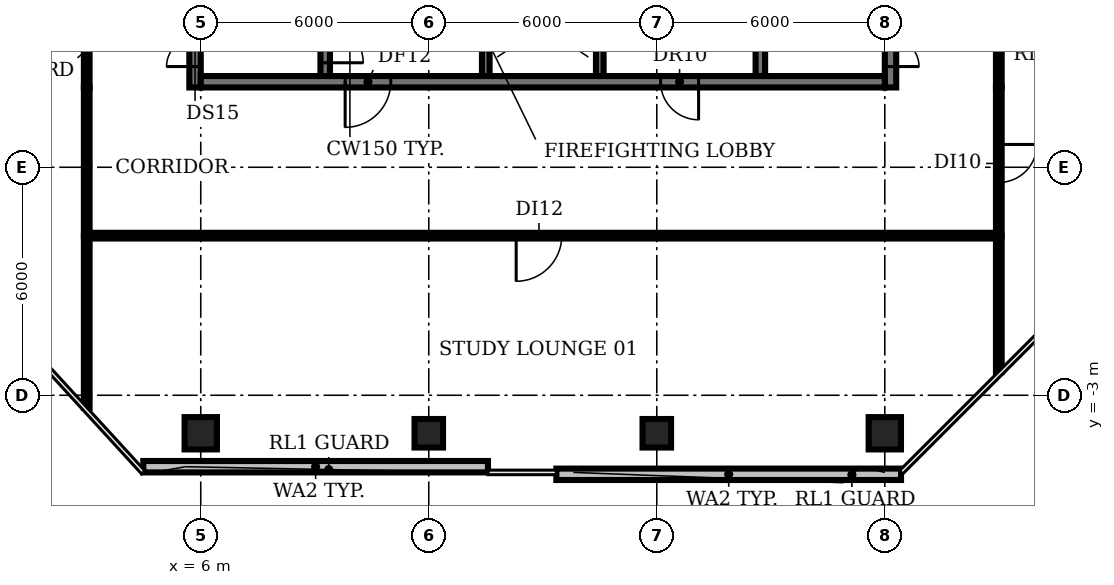
"""IFC4 building model, lengths in metres.
Left out: names, types, materials, properties, quantities, classifications, styles, units other than length and angle.
Written with IfcOpenShell. Run it as: python <this file> out.ifc"""

import sys

from ifc_helpers import new_model, si_unit, direction, frame, frame_2d, origin, origin_2d, place, context, subcontext, project, spatial, rectangle, circle, extrude, element, fill, save


model = new_model("IFC4")
c1 = context("Model", 3, precision=1e-05, world=origin(), true_north=direction((0.0, 1.0)))
c2 = subcontext(c1, "Body", "Model", "MODEL_VIEW")
j1 = project(units=[si_unit("LENGTHUNIT", "METRE"), si_unit("PLANEANGLEUNIT", "RADIAN")], contexts=[c1])
p1 = place(None, origin())
s1 = spatial("IfcSite", under=j1, at=p1, CompositionType="ELEMENT")
p2 = place(p1, origin())
s2 = spatial("IfcBuilding", under=s1, at=p2, CompositionType="ELEMENT")
p3 = place(p2, frame((0.0, 0.0, 276.8)))
s3 = spatial("IfcBuildingStorey", under=s2, at=p3, CompositionType="ELEMENT", Elevation=276.8)
p4 = place(p3, frame((6.0, -4.0, 0.0), z_axis=(0.0, 0.0, 1.0), x_axis=(1.0, 0.0, 0.0)))
e1 = element("IfcColumn", 1, at=p4, inside=s3, PredefinedType="COLUMN", context=c2, shape_type="SweptSolid", body=[
    extrude(circle(Radius=0.425, at=origin_2d()), origin(), (0.0, 0.0, 1.0), 3.85),
])
for number, where, z_axis, x_axis in (
    (2, (12.0, -4.0, 0.0), (0.0, 0.0, 1.0), (1.0, 0.0, 0.0)),
    (3, (18.0, -4.0, 0.0), (0.0, 0.0, 1.0), (1.0, 0.0, 0.0)),
):
    element("IfcColumn", number, at=place(p3, frame(where, z_axis=z_axis, x_axis=x_axis)), inside=s3, PredefinedType="COLUMN", context=c2, shape_type="SweptSolid", body=[
        extrude(rectangle(XDim=0.75, YDim=0.75, at=origin_2d()), origin(), (0.0, 0.0, 1.0), 3.85),
    ])
p5 = place(p3, frame((24.0, -4.0, 0.0), z_axis=(0.0, 0.0, 1.0), x_axis=(1.0, 0.0, 0.0)))
e4 = element("IfcColumn", 4, at=p5, inside=s3, PredefinedType="COLUMN", context=c2, shape_type="SweptSolid", body=[
    extrude(circle(Radius=0.425, at=origin_2d()), origin(), (0.0, 0.0, 1.0), 3.85),
])
p6 = place(p3, frame((4.489, -4.88, 0.0), z_axis=(0.0, 0.0, 1.0), x_axis=(1.0, 0.0, 0.0)))
e5 = element("IfcWall", 5, at=p6, inside=s3, PredefinedType="SOLIDWALL", context=c2, shape_type="SweptSolid", body=[
    extrude(rectangle(XDim=9.069, YDim=0.3, at=frame_2d((4.535, 0.0))), origin(), (0.0, 0.0, 1.0), 3.85),
])
p7 = place(p3, frame((15.358, -5.08, 0.0), z_axis=(0.0, 0.0, 1.0), x_axis=(1.0, 0.0, 0.0)))
e6 = element("IfcWall", 6, at=p7, inside=s3, PredefinedType="SOLIDWALL", context=c2, shape_type="SweptSolid", body=[
    extrude(rectangle(XDim=9.069, YDim=0.3, at=frame_2d((4.534, 0.0))), origin(), (0.0, 0.0, 1.0), 3.85),
])
p8 = place(p3, frame((9.275, 11.825, 0.0), z_axis=(0.0, 0.0, 1.0), x_axis=(0.0, -1.0, 0.0)))
e7 = element("IfcWall", 7, at=p8, inside=s3, PredefinedType="SHEAR", context=c2, shape_type="SweptSolid", body=[
    extrude(rectangle(XDim=6.425, YDim=0.25, at=frame_2d((3.212, 0.0))), origin(), (0.0, 0.0, 1.0), 3.85),
])
p9 = place(p8, frame((5.075, 0.0, 0.0)))
e8 = element("IfcOpeningElement", 8, at=p9, cuts=e7, PredefinedType="OPENING", context=c2, shape_type="SweptSolid", body=[
    extrude(rectangle(XDim=1.0, YDim=2.1, at=frame_2d((0.5, 1.05))), frame((0.0, 0.135, 0.0), z_axis=(0.0, -1.0, 0.0), x_axis=(1.0, 0.0, 0.0)), (0.0, 0.0, 1.0), 0.27),
])
p10 = place(p3, frame((13.5, 5.4, 0.0), z_axis=(0.0, 0.0, 1.0), x_axis=(0.0, 1.0, 0.0)))
e9 = element("IfcWall", 9, at=p10, inside=s3, PredefinedType="SHEAR", context=c2, shape_type="SweptSolid", body=[
    extrude(rectangle(XDim=8.2, YDim=0.2, at=frame_2d((4.1, 0.0))), origin(), (0.0, 0.0, 1.0), 3.85),
])
p11 = place(p10, frame((0.75, 0.0, 0.0)))
e10 = element("IfcOpeningElement", 10, at=p11, cuts=e9, PredefinedType="OPENING", context=c2, shape_type="SweptSolid", body=[
    extrude(rectangle(XDim=1.1, YDim=2.1, at=frame_2d((0.55, 1.05))), frame((0.0, 0.11, 0.0), z_axis=(0.0, -1.0, 0.0), x_axis=(1.0, 0.0, 0.0)), (0.0, 0.0, 1.0), 0.22),
])
p12 = place(p10, frame((3.55, 0.0, 0.0)))
e11 = element("IfcOpeningElement", 11, at=p12, cuts=e9, PredefinedType="OPENING", context=c2, shape_type="SweptSolid", body=[
    extrude(rectangle(XDim=1.1, YDim=2.1, at=frame_2d((0.55, 1.05))), frame((0.0, 0.11, 0.0), z_axis=(0.0, -1.0, 0.0), x_axis=(1.0, 0.0, 0.0)), (0.0, 0.0, 1.0), 0.22),
])
p13 = place(p10, frame((6.35, 0.0, 0.0)))
e12 = element("IfcOpeningElement", 12, at=p13, cuts=e9, PredefinedType="OPENING", context=c2, shape_type="SweptSolid", body=[
    extrude(rectangle(XDim=1.1, YDim=2.1, at=frame_2d((0.55, 1.05))), frame((0.0, 0.11, 0.0), z_axis=(0.0, -1.0, 0.0), x_axis=(1.0, 0.0, 0.0)), (0.0, 0.0, 1.0), 0.22),
])
p14 = place(p3, frame((16.5, 5.4, 0.0), z_axis=(0.0, 0.0, 1.0), x_axis=(0.0, 1.0, 0.0)))
e13 = element("IfcWall", 13, at=p14, inside=s3, PredefinedType="SHEAR", context=c2, shape_type="SweptSolid", body=[
    extrude(rectangle(XDim=8.2, YDim=0.2, at=frame_2d((4.1, 0.0))), origin(), (0.0, 0.0, 1.0), 3.85),
])
p15 = place(p3, frame((20.725, 5.4, 0.0), z_axis=(0.0, 0.0, 1.0), x_axis=(0.0, 1.0, 0.0)))
e14 = element("IfcWall", 14, at=p15, inside=s3, PredefinedType="SHEAR", context=c2, shape_type="SweptSolid", body=[
    extrude(rectangle(XDim=6.3, YDim=0.25, at=frame_2d((3.15, 0.0))), origin(), (0.0, 0.0, 1.0), 3.85),
])
p16 = place(p3, frame((5.85, 5.1, 0.0), z_axis=(0.0, 0.0, 1.0), x_axis=(0.0, 1.0, 0.0)))
e15 = element("IfcWall", 15, at=p16, inside=s3, PredefinedType="SHEAR", context=c2, shape_type="SweptSolid", body=[
    extrude(rectangle(XDim=20.0, YDim=0.3, at=frame_2d((10.0, 0.0))), origin(), (0.0, 0.0, 1.0), 3.85),
])
p17 = place(p16, frame((0.55, 0.0, 0.0)))
e16 = element("IfcOpeningElement", 16, at=p17, cuts=e15, PredefinedType="OPENING", context=c2, shape_type="SweptSolid", body=[
    extrude(rectangle(XDim=1.5, YDim=2.1, at=frame_2d((0.75, 1.05))), frame((0.0, 0.16, 0.0), z_axis=(0.0, -1.0, 0.0), x_axis=(1.0, 0.0, 0.0)), (0.0, 0.0, 1.0), 0.32),
])
p18 = place(p16, frame((7.0, 0.0, 0.0)))
e17 = element("IfcOpeningElement", 17, at=p18, cuts=e15, PredefinedType="OPENING", context=c2, shape_type="SweptSolid", body=[
    extrude(rectangle(XDim=1.2, YDim=2.1, at=frame_2d((0.6, 1.05))), frame((0.0, 0.16, 0.0), z_axis=(0.0, -1.0, 0.0), x_axis=(1.0, 0.0, 0.0)), (0.0, 0.0, 1.0), 0.32),
])
p19 = place(p16, frame((13.55, 0.0, 0.0)))
e18 = element("IfcOpeningElement", 18, at=p19, cuts=e15, PredefinedType="OPENING", context=c2, shape_type="SweptSolid", body=[
    extrude(rectangle(XDim=1.2, YDim=2.1, at=frame_2d((0.6, 1.05))), frame((0.0, 0.16, 0.0), z_axis=(0.0, -1.0, 0.0), x_axis=(1.0, 0.0, 0.0)), (0.0, 0.0, 1.0), 0.32),
])
p20 = place(p3, frame((24.15, 25.655, 0.0), z_axis=(0.0, 0.0, 1.0), x_axis=(0.0, -1.0, 0.0)))
e19 = element("IfcWall", 19, at=p20, inside=s3, PredefinedType="SHEAR", context=c2, shape_type="SweptSolid", body=[
    extrude(rectangle(XDim=20.555, YDim=0.3, at=frame_2d((10.277, 0.0))), origin(), (0.0, 0.0, 1.0), 3.85),
])
p21 = place(p20, frame((18.505, 0.0, 0.0)))
e20 = element("IfcOpeningElement", 20, at=p21, cuts=e19, PredefinedType="OPENING", context=c2, shape_type="SweptSolid", body=[
    extrude(rectangle(XDim=1.5, YDim=2.1, at=frame_2d((0.75, 1.05))), frame((0.0, 0.16, 0.0), z_axis=(0.0, -1.0, 0.0), x_axis=(1.0, 0.0, 0.0)), (0.0, 0.0, 1.0), 0.32),
])
p22 = place(p20, frame((12.405, 0.0, 0.0)))
e21 = element("IfcOpeningElement", 21, at=p22, cuts=e19, PredefinedType="OPENING", context=c2, shape_type="SweptSolid", body=[
    extrude(rectangle(XDim=0.9, YDim=2.1, at=frame_2d((0.45, 1.05))), frame((0.0, 0.16, 0.0), z_axis=(0.0, -1.0, 0.0), x_axis=(1.0, 0.0, 0.0)), (0.0, 0.0, 1.0), 0.32),
])
p23 = place(p20, frame((6.405, 0.0, 0.0)))
e22 = element("IfcOpeningElement", 22, at=p23, cuts=e19, PredefinedType="OPENING", context=c2, shape_type="SweptSolid", body=[
    extrude(rectangle(XDim=2.0, YDim=2.1, at=frame_2d((1.0, 1.05))), frame((0.0, 0.16, 0.0), z_axis=(0.0, -1.0, 0.0), x_axis=(1.0, 0.0, 0.0)), (0.0, 0.0, 1.0), 0.32),
])
p24 = place(p3, frame((24.0, 5.25, 0.0), z_axis=(0.0, 0.0, 1.0), x_axis=(-1.0, 0.0, 0.0)))
e23 = element("IfcWall", 23, at=p24, inside=s3, PredefinedType="SHEAR", context=c2, shape_type="SweptSolid", body=[
    extrude(rectangle(XDim=18.0, YDim=0.3, at=frame_2d((9.0, 0.0))), origin(), (0.0, 0.0, 1.0), 3.85),
])
p25 = place(p24, frame((13.0, 0.0, 0.0)))
e24 = element("IfcOpeningElement", 24, at=p25, cuts=e23, PredefinedType="OPENING", context=c2, shape_type="SweptSolid", body=[
    extrude(rectangle(XDim=1.2, YDim=2.1, at=frame_2d((0.6, 1.05))), frame((0.0, 0.16, 0.0), z_axis=(0.0, -1.0, 0.0), x_axis=(1.0, 0.0, 0.0)), (0.0, 0.0, 1.0), 0.32),
])
p26 = place(p24, frame((4.9, 0.0, 0.0)))
e25 = element("IfcOpeningElement", 25, at=p26, cuts=e23, PredefinedType="OPENING", context=c2, shape_type="SweptSolid", body=[
    extrude(rectangle(XDim=1.0, YDim=2.1, at=frame_2d((0.5, 1.05))), frame((0.0, 0.16, 0.0), z_axis=(0.0, -1.0, 0.0), x_axis=(1.0, 0.0, 0.0)), (0.0, 0.0, 1.0), 0.32),
])
p27 = place(p3, frame((3.0, -3.33, 0.0), z_axis=(0.0, 0.0, 1.0), x_axis=(0.0, 1.0, 0.0)))
e26 = element("IfcWall", 26, at=p27, inside=s3, PredefinedType="PARTITIONING", context=c2, shape_type="SweptSolid", body=[
    extrude(rectangle(XDim=4.53, YDim=0.15, at=frame_2d((2.265, 0.0))), origin(), (0.0, 0.0, 1.0), 2.9),
])
p28 = place(p3, frame((3.0, 1.2, 0.0), z_axis=(0.0, 0.0, 1.0), x_axis=(0.0, 1.0, 0.0)))
e27 = element("IfcWall", 27, at=p28, inside=s3, PredefinedType="PARTITIONING", context=c2, shape_type="SweptSolid", body=[
    extrude(rectangle(XDim=3.9, YDim=0.15, at=frame_2d((1.95, 0.0))), origin(), (0.0, 0.0, 1.0), 2.9),
])
p29 = place(p3, frame((3.0, 5.1, 0.0), z_axis=(0.0, 0.0, 1.0), x_axis=(0.0, 1.0, 0.0)))
e28 = element("IfcWall", 28, at=p29, inside=s3, PredefinedType="PARTITIONING", context=c2, shape_type="SweptSolid", body=[
    extrude(rectangle(XDim=20.0, YDim=0.15, at=frame_2d((10.0, 0.0))), origin(), (0.0, 0.0, 1.0), 2.9),
])
p30 = place(p29, frame((9.3, 0.0, 0.0)))
e29 = element("IfcOpeningElement", 29, at=p30, cuts=e28, PredefinedType="OPENING", context=c2, shape_type="SweptSolid", body=[
    extrude(rectangle(XDim=1.2, YDim=2.1, at=frame_2d((0.6, 1.05))), frame((0.0, 0.085, 0.0), z_axis=(0.0, -1.0, 0.0), x_axis=(1.0, 0.0, 0.0)), (0.0, 0.0, 1.0), 0.17),
])
p31 = place(p3, frame((27.0, -2.39, 0.0), z_axis=(0.0, 0.0, 1.0), x_axis=(0.0, 1.0, 0.0)))
e30 = element("IfcWall", 30, at=p31, inside=s3, PredefinedType="PARTITIONING", context=c2, shape_type="SweptSolid", body=[
    extrude(rectangle(XDim=3.59, YDim=0.15, at=frame_2d((1.795, 0.0))), origin(), (0.0, 0.0, 1.0), 2.9),
])
p32 = place(p3, frame((27.0, 1.2, 0.0), z_axis=(0.0, 0.0, 1.0), x_axis=(-1.0, 0.0, 0.0)))
e31 = element("IfcWall", 31, at=p32, inside=s3, PredefinedType="PARTITIONING", context=c2, shape_type="SweptSolid", body=[
    extrude(rectangle(XDim=24.0, YDim=0.15, at=frame_2d((12.0, 0.0))), origin(), (0.0, 0.0, 1.0), 2.9),
])
p33 = place(p32, frame((11.5, 0.0, 0.0)))
e32 = element("IfcOpeningElement", 32, at=p33, cuts=e31, PredefinedType="OPENING", context=c2, shape_type="SweptSolid", body=[
    extrude(rectangle(XDim=1.2, YDim=2.1, at=frame_2d((0.6, 1.05))), frame((0.0, 0.085, 0.0), z_axis=(0.0, -1.0, 0.0), x_axis=(1.0, 0.0, 0.0)), (0.0, 0.0, 1.0), 0.17),
])
p34 = place(p3, frame((27.0, 5.1, 0.0), z_axis=(0.0, 0.0, 1.0), x_axis=(0.0, -1.0, 0.0)))
e33 = element("IfcWall", 33, at=p34, inside=s3, PredefinedType="PARTITIONING", context=c2, shape_type="SweptSolid", body=[
    extrude(rectangle(XDim=3.9, YDim=0.15, at=frame_2d((1.95, 0.0))), origin(), (0.0, 0.0, 1.0), 2.9),
])
p35 = place(p34, frame((1.5, 0.0, 0.0)))
e34 = element("IfcOpeningElement", 34, at=p35, cuts=e33, PredefinedType="OPENING", context=c2, shape_type="SweptSolid", body=[
    extrude(rectangle(XDim=1.0, YDim=2.1, at=frame_2d((0.5, 1.05))), frame((0.0, 0.085, 0.0), z_axis=(0.0, -1.0, 0.0), x_axis=(1.0, 0.0, 0.0)), (0.0, 0.0, 1.0), 0.17),
])
p36 = place(p3, frame((27.0, 5.1, 0.0), z_axis=(0.0, 0.0, 1.0), x_axis=(0.0, 1.0, 0.0)))
e35 = element("IfcWall", 35, at=p36, inside=s3, PredefinedType="PARTITIONING", context=c2, shape_type="SweptSolid", body=[
    extrude(rectangle(XDim=3.75, YDim=0.15, at=frame_2d((1.875, 0.0))), origin(), (0.0, 0.0, 1.0), 2.9),
])
p37 = place(p9, origin())
e36 = element("IfcDoor", 36, at=p37, inside=s3, OperationType="SINGLE_SWING_RIGHT", PredefinedType="DOOR", context=c2, shape_type="SweptSolid", body=[
    extrude(rectangle(XDim=1.0, YDim=2.1, at=frame_2d((0.5, 1.05))), frame((0.0, 0.025, 0.0), z_axis=(0.0, -1.0, 0.0), x_axis=(1.0, 0.0, 0.0)), (0.0, 0.0, 1.0), 0.05),
])
fill(e8, e36)
p38 = place(p17, origin())
e37 = element("IfcDoor", 37, at=p38, inside=s3, OperationType="DOUBLE_DOOR_SINGLE_SWING", PredefinedType="DOOR", context=c2, shape_type="SweptSolid", body=[
    extrude(rectangle(XDim=1.5, YDim=2.1, at=frame_2d((0.75, 1.05))), frame((0.0, 0.025, 0.0), z_axis=(0.0, -1.0, 0.0), x_axis=(1.0, 0.0, 0.0)), (0.0, 0.0, 1.0), 0.05),
])
fill(e16, e37)
p39 = place(p21, origin())
e38 = element("IfcDoor", 38, at=p39, inside=s3, OperationType="DOUBLE_DOOR_SINGLE_SWING", PredefinedType="DOOR", context=c2, shape_type="SweptSolid", body=[
    extrude(rectangle(XDim=1.5, YDim=2.1, at=frame_2d((0.75, 1.05))), frame((0.0, 0.025, 0.0), z_axis=(0.0, -1.0, 0.0), x_axis=(1.0, 0.0, 0.0)), (0.0, 0.0, 1.0), 0.05),
])
fill(e20, e38)
p40 = place(p25, origin())
e39 = element("IfcDoor", 39, at=p40, inside=s3, OperationType="SINGLE_SWING_RIGHT", PredefinedType="DOOR", context=c2, shape_type="SweptSolid", body=[
    extrude(rectangle(XDim=1.2, YDim=2.1, at=frame_2d((0.6, 1.05))), frame((0.0, 0.025, 0.0), z_axis=(0.0, -1.0, 0.0), x_axis=(1.0, 0.0, 0.0)), (0.0, 0.0, 1.0), 0.05),
])
fill(e24, e39)
p41 = place(p26, origin())
e40 = element("IfcDoor", 40, at=p41, inside=s3, OperationType="SINGLE_SWING_LEFT", PredefinedType="DOOR", context=c2, shape_type="SweptSolid", body=[
    extrude(rectangle(XDim=1.0, YDim=2.1, at=frame_2d((0.5, 1.05))), frame((0.0, 0.025, 0.0), z_axis=(0.0, -1.0, 0.0), x_axis=(1.0, 0.0, 0.0)), (0.0, 0.0, 1.0), 0.05),
])
fill(e25, e40)
p42 = place(p33, origin())
e41 = element("IfcDoor", 41, at=p42, inside=s3, OperationType="SINGLE_SWING_RIGHT", PredefinedType="DOOR", context=c2, shape_type="SweptSolid", body=[
    extrude(rectangle(XDim=1.2, YDim=2.1, at=frame_2d((0.6, 1.05))), frame((0.0, 0.025, 0.0), z_axis=(0.0, -1.0, 0.0), x_axis=(1.0, 0.0, 0.0)), (0.0, 0.0, 1.0), 0.05),
])
fill(e32, e41)
p43 = place(p35, origin())
e42 = element("IfcDoor", 42, at=p43, inside=s3, OperationType="SINGLE_SWING_LEFT", PredefinedType="DOOR", context=c2, shape_type="SweptSolid", body=[
    extrude(rectangle(XDim=1.0, YDim=2.1, at=frame_2d((0.5, 1.05))), frame((0.0, 0.025, 0.0), z_axis=(0.0, -1.0, 0.0), x_axis=(1.0, 0.0, 0.0)), (0.0, 0.0, 1.0), 0.05),
])
fill(e34, e42)
save(model, sys.argv[1])
